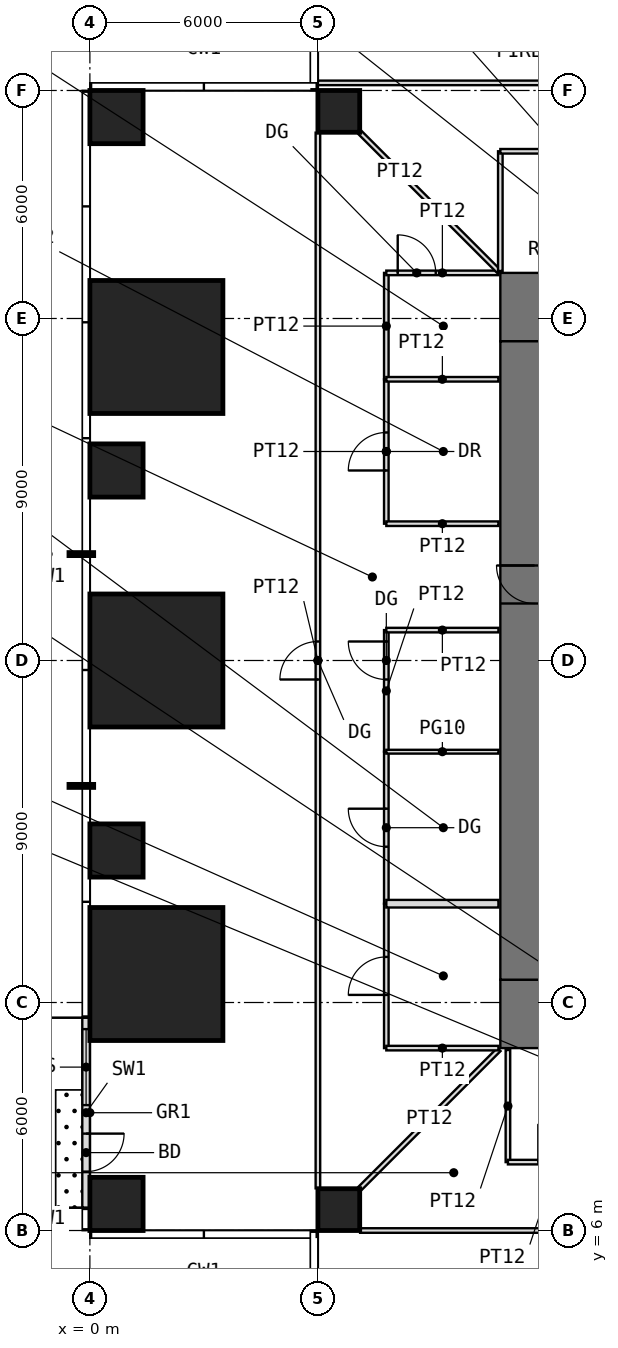
"""IFC4 building model, lengths in metres.
Left out: names, types, materials, properties, quantities, classifications, styles, units other than length and angle.
Written with IfcOpenShell. Run it as: python <this file> out.ifc"""

import sys

from ifc_helpers import new_model, si_unit, direction, frame, frame_2d, origin, origin_2d, place, context, subcontext, project, spatial, rectangle, extrude, element, fill, save


model = new_model("IFC4")
c1 = context("Model", 3, precision=1e-05, world=origin(), true_north=direction((0.0, 1.0)))
c2 = subcontext(c1, "Body", "Model", "MODEL_VIEW")
j1 = project(units=[si_unit("LENGTHUNIT", "METRE"), si_unit("PLANEANGLEUNIT", "RADIAN")], contexts=[c1])
p1 = place(None, origin())
s1 = spatial("IfcSite", under=j1, at=p1, CompositionType="ELEMENT")
p2 = place(p1, origin())
s2 = spatial("IfcBuilding", under=s1, at=p2, CompositionType="ELEMENT")
p3 = place(p2, frame((0.0, 0.0, 62.5)))
s3 = spatial("IfcBuildingStorey", under=s2, at=p3, CompositionType="ELEMENT", Elevation=62.5)
p4 = place(p3, frame((0.7, 6.7, 0.0), z_axis=(0.0, 0.0, 1.0), x_axis=(1.0, 0.0, 0.0)))
e1 = element("IfcColumn", 1, at=p4, inside=s3, PredefinedType="COLUMN", context=c2, shape_type="SweptSolid", body=[
    extrude(rectangle(XDim=1.4, YDim=1.4, at=origin_2d()), origin(), (0.0, 0.0, 1.0), 4.0),
])
p5 = place(p3, frame((6.55, 6.55, 0.0), z_axis=(0.0, 0.0, 1.0), x_axis=(1.0, 0.0, 0.0)))
e2 = element("IfcColumn", 2, at=p5, inside=s3, PredefinedType="COLUMN", context=c2, shape_type="SweptSolid", body=[
    extrude(rectangle(XDim=1.1, YDim=1.1, at=origin_2d()), origin(), (0.0, 0.0, 1.0), 4.0),
])
p6 = place(p3, frame((1.75, 12.75, 0.0), z_axis=(0.0, 0.0, 1.0), x_axis=(1.0, 0.0, 0.0)))
e3 = element("IfcColumn", 3, at=p6, inside=s3, PredefinedType="COLUMN", context=c2, shape_type="SweptSolid", body=[
    extrude(rectangle(XDim=3.5, YDim=3.5, at=origin_2d()), origin(), (0.0, 0.0, 1.0), 4.0),
])
p7 = place(p3, frame((0.7, 16.0, 0.0), z_axis=(0.0, 0.0, 1.0), x_axis=(1.0, 0.0, 0.0)))
e4 = element("IfcColumn", 4, at=p7, inside=s3, PredefinedType="COLUMN", context=c2, shape_type="SweptSolid", body=[
    extrude(rectangle(XDim=1.4, YDim=1.4, at=origin_2d()), origin(), (0.0, 0.0, 1.0), 4.0),
])
p8 = place(p3, frame((1.75, 21.0, 0.0), z_axis=(0.0, 0.0, 1.0), x_axis=(1.0, 0.0, 0.0)))
e5 = element("IfcColumn", 5, at=p8, inside=s3, PredefinedType="COLUMN", context=c2, shape_type="SweptSolid", body=[
    extrude(rectangle(XDim=3.5, YDim=3.5, at=origin_2d()), origin(), (0.0, 0.0, 1.0), 4.0),
])
p9 = place(p3, frame((0.7, 26.0, 0.0), z_axis=(0.0, 0.0, 1.0), x_axis=(1.0, 0.0, 0.0)))
e6 = element("IfcColumn", 6, at=p9, inside=s3, PredefinedType="COLUMN", context=c2, shape_type="SweptSolid", body=[
    extrude(rectangle(XDim=1.4, YDim=1.4, at=origin_2d()), origin(), (0.0, 0.0, 1.0), 4.0),
])
p10 = place(p3, frame((1.75, 29.25, 0.0), z_axis=(0.0, 0.0, 1.0), x_axis=(1.0, 0.0, 0.0)))
e7 = element("IfcColumn", 7, at=p10, inside=s3, PredefinedType="COLUMN", context=c2, shape_type="SweptSolid", body=[
    extrude(rectangle(XDim=3.5, YDim=3.5, at=origin_2d()), origin(), (0.0, 0.0, 1.0), 4.0),
])
p11 = place(p3, frame((0.7, 35.3, 0.0), z_axis=(0.0, 0.0, 1.0), x_axis=(1.0, 0.0, 0.0)))
e8 = element("IfcColumn", 8, at=p11, inside=s3, PredefinedType="COLUMN", context=c2, shape_type="SweptSolid", body=[
    extrude(rectangle(XDim=1.4, YDim=1.4, at=origin_2d()), origin(), (0.0, 0.0, 1.0), 4.0),
])
p12 = place(p3, frame((6.55, 35.45, 0.0), z_axis=(0.0, 0.0, 1.0), x_axis=(1.0, 0.0, 0.0)))
e9 = element("IfcColumn", 9, at=p12, inside=s3, PredefinedType="COLUMN", context=c2, shape_type="SweptSolid", body=[
    extrude(rectangle(XDim=1.1, YDim=1.1, at=origin_2d()), origin(), (0.0, 0.0, 1.0), 4.0),
])
p13 = place(p3, frame((-0.1, 11.6, 0.0), z_axis=(0.0, 0.0, 1.0), x_axis=(0.0, -1.0, 0.0)))
e10 = element("IfcWall", 10, at=p13, inside=s3, PredefinedType="USERDEFINED", context=c2, shape_type="SweptSolid", body=[
    extrude(rectangle(XDim=5.0, YDim=0.2, at=frame_2d((2.5, 0.0))), origin(), (0.0, 0.0, 1.0), 3.75),
])
p14 = place(p13, frame((3.05, 0.0, 0.0)))
e11 = element("IfcOpeningElement", 11, at=p14, cuts=e10, PredefinedType="OPENING", context=c2, shape_type="SweptSolid", body=[
    extrude(rectangle(XDim=1.0, YDim=2.4, at=frame_2d((0.5, 1.2))), frame((0.0, 0.11, 0.0), z_axis=(0.0, -1.0, 0.0), x_axis=(1.0, 0.0, 0.0)), (0.0, 0.0, 1.0), 0.22),
])
p15 = place(p13, frame((0.3, 0.0, 0.3)))
e12 = element("IfcOpeningElement", 12, at=p15, cuts=e10, PredefinedType="OPENING", context=c2, shape_type="SweptSolid", body=[
    extrude(rectangle(XDim=2.0, YDim=2.7, at=frame_2d((1.0, 1.35))), frame((0.0, 0.11, 0.0), z_axis=(0.0, -1.0, 0.0), x_axis=(1.0, 0.0, 0.0)), (0.0, 0.0, 1.0), 0.22),
])
p16 = place(p3, frame((10.8, 11.7, -0.05), z_axis=(0.0, 0.0, 1.0), x_axis=(1.0, 0.0, 0.0)))
e13 = element("IfcWall", 13, at=p16, inside=s3, PredefinedType="SHEAR", context=c2, shape_type="SweptSolid", body=[
    extrude(rectangle(XDim=20.4, YDim=1.8, at=frame_2d((10.2, 0.0))), origin(), (0.0, 0.0, 1.0), 4.0),
])
p17 = place(p16, frame((9.2, 0.0, 0.05)))
e14 = element("IfcOpeningElement", 14, at=p17, cuts=e13, PredefinedType="OPENING", context=c2, shape_type="SweptSolid", body=[
    extrude(rectangle(XDim=2.0, YDim=2.2, at=frame_2d((1.0, 1.1))), frame((0.0, 0.91, 0.0), z_axis=(0.0, -1.0, 0.0), x_axis=(1.0, 0.0, 0.0)), (0.0, 0.0, 1.0), 1.82),
])
p18 = place(p3, frame((10.8, 30.3, -0.05), z_axis=(0.0, 0.0, 1.0), x_axis=(1.0, 0.0, 0.0)))
e15 = element("IfcWall", 15, at=p18, inside=s3, PredefinedType="SHEAR", context=c2, shape_type="SweptSolid", body=[
    extrude(rectangle(XDim=20.4, YDim=1.8, at=frame_2d((10.2, 0.0))), origin(), (0.0, 0.0, 1.0), 4.0),
])
p19 = place(p18, frame((9.2, 0.0, 0.05)))
e16 = element("IfcOpeningElement", 16, at=p19, cuts=e15, PredefinedType="OPENING", context=c2, shape_type="SweptSolid", body=[
    extrude(rectangle(XDim=2.0, YDim=2.2, at=frame_2d((1.0, 1.1))), frame((0.0, 0.91, 0.0), z_axis=(0.0, -1.0, 0.0), x_axis=(1.0, 0.0, 0.0)), (0.0, 0.0, 1.0), 1.82),
])
p20 = place(p3, frame((11.7, 12.6, -0.05), z_axis=(0.0, 0.0, 1.0), x_axis=(0.0, 1.0, 0.0)))
e17 = element("IfcWall", 17, at=p20, inside=s3, PredefinedType="SHEAR", context=c2, shape_type="SweptSolid", body=[
    extrude(rectangle(XDim=16.8, YDim=1.8, at=frame_2d((8.4, 0.0))), origin(), (0.0, 0.0, 1.0), 4.0),
])
p21 = place(p20, frame((9.9, 0.0, 0.05)))
e18 = element("IfcOpeningElement", 18, at=p21, cuts=e17, PredefinedType="OPENING", context=c2, shape_type="SweptSolid", body=[
    extrude(rectangle(XDim=1.0, YDim=2.2, at=frame_2d((0.5, 1.1))), frame((0.0, 0.91, 0.0), z_axis=(0.0, -1.0, 0.0), x_axis=(1.0, 0.0, 0.0)), (0.0, 0.0, 1.0), 1.82),
])
p22 = place(p3, frame((6.0, 7.11, 0.0), z_axis=(0.0, 0.0, 1.0), x_axis=(0.0, 1.0, 0.0)))
e19 = element("IfcWall", 19, at=p22, inside=s3, PredefinedType="PARTITIONING", context=c2, shape_type="SweptSolid", body=[
    extrude(rectangle(XDim=27.78, YDim=0.12, at=frame_2d((13.89, 0.0))), origin(), (0.0, 0.0, 1.0), 3.75),
])
p23 = place(p22, frame((13.39, 0.0, 0.0)))
e20 = element("IfcOpeningElement", 20, at=p23, cuts=e19, PredefinedType="OPENING", context=c2, shape_type="SweptSolid", body=[
    extrude(rectangle(XDim=1.0, YDim=2.4, at=frame_2d((0.5, 1.2))), frame((0.0, 0.07, 0.0), z_axis=(0.0, -1.0, 0.0), x_axis=(1.0, 0.0, 0.0)), (0.0, 0.0, 1.0), 0.14),
])
p24 = place(p3, frame((6.0, 36.2, 0.0), z_axis=(0.0, 0.0, 1.0), x_axis=(1.0, 0.0, 0.0)))
e21 = element("IfcWall", 21, at=p24, inside=s3, PredefinedType="PARTITIONING", context=c2, shape_type="SweptSolid", body=[
    extrude(rectangle(XDim=30.0, YDim=0.12, at=frame_2d((15.0, 0.0))), origin(), (0.0, 0.0, 1.0), 3.75),
])
p25 = place(p24, frame((14.5, 0.0, 0.0)))
e22 = element("IfcOpeningElement", 22, at=p25, cuts=e21, PredefinedType="OPENING", context=c2, shape_type="SweptSolid", body=[
    extrude(rectangle(XDim=1.0, YDim=2.4, at=frame_2d((0.5, 1.2))), frame((0.0, 0.07, 0.0), z_axis=(0.0, -1.0, 0.0), x_axis=(1.0, 0.0, 0.0)), (0.0, 0.0, 1.0), 0.14),
])
p26 = place(p3, frame((7.11, 6.0, 0.0), z_axis=(0.0, 0.0, 1.0), x_axis=(1.0, 0.0, 0.0)))
e23 = element("IfcWall", 23, at=p26, inside=s3, PredefinedType="PARTITIONING", context=c2, shape_type="SweptSolid", body=[
    extrude(rectangle(XDim=27.78, YDim=0.12, at=frame_2d((13.89, 0.0))), origin(), (0.0, 0.0, 1.0), 3.75),
])
p27 = place(p26, frame((13.39, 0.0, 0.0)))
e24 = element("IfcOpeningElement", 24, at=p27, cuts=e23, PredefinedType="OPENING", context=c2, shape_type="SweptSolid", body=[
    extrude(rectangle(XDim=1.0, YDim=2.4, at=frame_2d((0.5, 1.2))), frame((0.0, 0.07, 0.0), z_axis=(0.0, -1.0, 0.0), x_axis=(1.0, 0.0, 0.0)), (0.0, 0.0, 1.0), 0.14),
])
p28 = place(p3, frame((7.11, 7.11, 0.0), z_axis=(0.0, 0.0, 1.0), x_axis=(0.707106781187, 0.707106781187, 0.0)))
e25 = element("IfcWall", 25, at=p28, inside=s3, PredefinedType="PARTITIONING", context=c2, shape_type="SweptSolid", body=[
    extrude(rectangle(XDim=5.168, YDim=0.12, at=frame_2d((2.584, 0.0))), origin(), (0.0, 0.0, 1.0), 3.75),
])
p29 = place(p3, frame((7.11, 34.89, 0.0), z_axis=(0.0, 0.0, 1.0), x_axis=(0.707106781187, -0.707106781187, 0.0)))
e26 = element("IfcWall", 26, at=p29, inside=s3, PredefinedType="PARTITIONING", context=c2, shape_type="SweptSolid", body=[
    extrude(rectangle(XDim=2.95, YDim=0.12, at=frame_2d((1.475, 0.0))), origin(), (0.0, 0.0, 1.0), 3.75),
])
p30 = place(p3, frame((7.8, 10.8, 0.0), z_axis=(0.0, 0.0, 1.0), x_axis=(0.0, 1.0, 0.0)))
e27 = element("IfcWall", 27, at=p30, inside=s3, PredefinedType="PARTITIONING", context=c2, shape_type="SweptSolid", body=[
    extrude(rectangle(XDim=3.8, YDim=0.12, at=frame_2d((1.9, 0.0))), origin(), (0.0, 0.0, 1.0), 3.75),
])
p31 = place(p30, frame((1.4, 0.0, 0.0)))
e28 = element("IfcOpeningElement", 28, at=p31, cuts=e27, PredefinedType="OPENING", context=c2, shape_type="SweptSolid", body=[
    extrude(rectangle(XDim=1.0, YDim=2.4, at=frame_2d((0.5, 1.2))), frame((0.0, 0.07, 0.0), z_axis=(0.0, -1.0, 0.0), x_axis=(1.0, 0.0, 0.0)), (0.0, 0.0, 1.0), 0.14),
])
p32 = place(p3, frame((7.8, 10.8, 0.0), z_axis=(0.0, 0.0, 1.0), x_axis=(1.0, 0.0, 0.0)))
e29 = element("IfcWall", 29, at=p32, inside=s3, PredefinedType="PARTITIONING", context=c2, shape_type="SweptSolid", body=[
    extrude(rectangle(XDim=2.95, YDim=0.12, at=frame_2d((1.475, 0.0))), origin(), (0.0, 0.0, 1.0), 3.75),
])
p33 = place(p3, frame((7.8, 14.6, 0.0), z_axis=(0.0, 0.0, 1.0), x_axis=(0.0, 1.0, 0.0)))
e30 = element("IfcWall", 30, at=p33, inside=s3, PredefinedType="PARTITIONING", context=c2, shape_type="SweptSolid", body=[
    extrude(rectangle(XDim=4.0, YDim=0.12, at=frame_2d((2.0, 0.0))), origin(), (0.0, 0.0, 1.0), 3.75),
])
p34 = place(p33, frame((1.5, 0.0, 0.0)))
e31 = element("IfcOpeningElement", 31, at=p34, cuts=e30, PredefinedType="OPENING", context=c2, shape_type="SweptSolid", body=[
    extrude(rectangle(XDim=1.0, YDim=2.4, at=frame_2d((0.5, 1.2))), frame((0.0, 0.07, 0.0), z_axis=(0.0, -1.0, 0.0), x_axis=(1.0, 0.0, 0.0)), (0.0, 0.0, 1.0), 0.14),
])
p35 = place(p3, frame((7.8, 14.6, 0.0), z_axis=(0.0, 0.0, 1.0), x_axis=(1.0, 0.0, 0.0)))
e32 = element("IfcWall", 32, at=p35, inside=s3, PredefinedType="PARTITIONING", context=c2, shape_type="SweptSolid", body=[
    extrude(rectangle(XDim=2.95, YDim=0.2, at=frame_2d((1.475, 0.0))), origin(), (0.0, 0.0, 1.0), 3.75),
])
p36 = place(p3, frame((7.8, 18.6, 0.0), z_axis=(0.0, 0.0, 1.0), x_axis=(0.0, 1.0, 0.0)))
e33 = element("IfcWall", 33, at=p36, inside=s3, PredefinedType="PARTITIONING", context=c2, shape_type="SweptSolid", body=[
    extrude(rectangle(XDim=3.2, YDim=0.12, at=frame_2d((1.6, 0.0))), origin(), (0.0, 0.0, 1.0), 3.75),
])
p37 = place(p36, frame((1.9, 0.0, 0.0)))
e34 = element("IfcOpeningElement", 34, at=p37, cuts=e33, PredefinedType="OPENING", context=c2, shape_type="SweptSolid", body=[
    extrude(rectangle(XDim=1.0, YDim=2.4, at=frame_2d((0.5, 1.2))), frame((0.0, 0.07, 0.0), z_axis=(0.0, -1.0, 0.0), x_axis=(1.0, 0.0, 0.0)), (0.0, 0.0, 1.0), 0.14),
])
p38 = place(p3, frame((7.8, 18.6, 0.0), z_axis=(0.0, 0.0, 1.0), x_axis=(1.0, 0.0, 0.0)))
e35 = element("IfcWall", 35, at=p38, inside=s3, PredefinedType="PARTITIONING", context=c2, shape_type="SweptSolid", body=[
    extrude(rectangle(XDim=2.95, YDim=0.1, at=frame_2d((1.475, 0.0))), origin(), (0.0, 0.0, 1.0), 3.75),
])
p39 = place(p3, frame((7.8, 21.8, 0.0), z_axis=(0.0, 0.0, 1.0), x_axis=(1.0, 0.0, 0.0)))
e36 = element("IfcWall", 36, at=p39, inside=s3, PredefinedType="PARTITIONING", context=c2, shape_type="SweptSolid", body=[
    extrude(rectangle(XDim=2.95, YDim=0.12, at=frame_2d((1.475, 0.0))), origin(), (0.0, 0.0, 1.0), 3.75),
])
p40 = place(p3, frame((7.8, 24.6, 0.0), z_axis=(0.0, 0.0, 1.0), x_axis=(0.0, 1.0, 0.0)))
e37 = element("IfcWall", 37, at=p40, inside=s3, PredefinedType="PARTITIONING", context=c2, shape_type="SweptSolid", body=[
    extrude(rectangle(XDim=3.8, YDim=0.12, at=frame_2d((1.9, 0.0))), origin(), (0.0, 0.0, 1.0), 3.75),
])
p41 = place(p40, frame((1.4, 0.0, 0.0)))
e38 = element("IfcOpeningElement", 38, at=p41, cuts=e37, PredefinedType="OPENING", context=c2, shape_type="SweptSolid", body=[
    extrude(rectangle(XDim=1.0, YDim=2.2, at=frame_2d((0.5, 1.1))), frame((0.0, 0.07, 0.0), z_axis=(0.0, -1.0, 0.0), x_axis=(1.0, 0.0, 0.0)), (0.0, 0.0, 1.0), 0.14),
])
p42 = place(p3, frame((7.8, 24.6, 0.0), z_axis=(0.0, 0.0, 1.0), x_axis=(1.0, 0.0, 0.0)))
e39 = element("IfcWall", 39, at=p42, inside=s3, PredefinedType="PARTITIONING", context=c2, shape_type="SweptSolid", body=[
    extrude(rectangle(XDim=2.95, YDim=0.12, at=frame_2d((1.475, 0.0))), origin(), (0.0, 0.0, 1.0), 3.75),
])
p43 = place(p3, frame((7.8, 28.4, 0.0), z_axis=(0.0, 0.0, 1.0), x_axis=(0.0, 1.0, 0.0)))
e40 = element("IfcWall", 40, at=p43, inside=s3, PredefinedType="PARTITIONING", context=c2, shape_type="SweptSolid", body=[
    extrude(rectangle(XDim=2.8, YDim=0.12, at=frame_2d((1.4, 0.0))), origin(), (0.0, 0.0, 1.0), 3.75),
])
p44 = place(p3, frame((7.8, 28.4, 0.0), z_axis=(0.0, 0.0, 1.0), x_axis=(1.0, 0.0, 0.0)))
e41 = element("IfcWall", 41, at=p44, inside=s3, PredefinedType="PARTITIONING", context=c2, shape_type="SweptSolid", body=[
    extrude(rectangle(XDim=2.95, YDim=0.12, at=frame_2d((1.475, 0.0))), origin(), (0.0, 0.0, 1.0), 3.75),
])
p45 = place(p3, frame((7.8, 31.2, 0.0), z_axis=(0.0, 0.0, 1.0), x_axis=(1.0, 0.0, 0.0)))
e42 = element("IfcWall", 42, at=p45, inside=s3, PredefinedType="PARTITIONING", context=c2, shape_type="SweptSolid", body=[
    extrude(rectangle(XDim=2.95, YDim=0.12, at=frame_2d((1.475, 0.0))), origin(), (0.0, 0.0, 1.0), 3.75),
])
p46 = place(p45, frame((0.3, 0.0, 0.0)))
e43 = element("IfcOpeningElement", 43, at=p46, cuts=e42, PredefinedType="OPENING", context=c2, shape_type="SweptSolid", body=[
    extrude(rectangle(XDim=1.0, YDim=2.4, at=frame_2d((0.5, 1.2))), frame((0.0, 0.07, 0.0), z_axis=(0.0, -1.0, 0.0), x_axis=(1.0, 0.0, 0.0)), (0.0, 0.0, 1.0), 0.14),
])
p47 = place(p3, frame((9.196, 32.804, 0.0), z_axis=(0.0, 0.0, 1.0), x_axis=(0.707106781187, -0.707106781187, 0.0)))
e44 = element("IfcWall", 44, at=p47, inside=s3, PredefinedType="PARTITIONING", context=c2, shape_type="SweptSolid", body=[
    extrude(rectangle(XDim=2.218, YDim=0.12, at=frame_2d((1.109, 0.0))), origin(), (0.0, 0.0, 1.0), 3.75),
])
p48 = place(p3, frame((10.8, 31.25, 0.0), z_axis=(0.0, 0.0, 1.0), x_axis=(0.0, 1.0, 0.0)))
e45 = element("IfcWall", 45, at=p48, inside=s3, PredefinedType="PARTITIONING", context=c2, shape_type="SweptSolid", body=[
    extrude(rectangle(XDim=3.15, YDim=0.12, at=frame_2d((1.575, 0.0))), origin(), (0.0, 0.0, 1.0), 3.75),
])
p49 = place(p3, frame((10.8, 34.4, 0.0), z_axis=(0.0, 0.0, 1.0), x_axis=(1.0, 0.0, 0.0)))
e46 = element("IfcWall", 46, at=p49, inside=s3, PredefinedType="PARTITIONING", context=c2, shape_type="SweptSolid", body=[
    extrude(rectangle(XDim=3.2, YDim=0.12, at=frame_2d((1.6, 0.0))), origin(), (0.0, 0.0, 1.0), 3.75),
])
p50 = place(p49, frame((1.1, 0.0, 0.0)))
e47 = element("IfcOpeningElement", 47, at=p50, cuts=e46, PredefinedType="OPENING", context=c2, shape_type="SweptSolid", body=[
    extrude(rectangle(XDim=1.0, YDim=2.2, at=frame_2d((0.5, 1.1))), frame((0.0, 0.07, 0.0), z_axis=(0.0, -1.0, 0.0), x_axis=(1.0, 0.0, 0.0)), (0.0, 0.0, 1.0), 0.14),
])
p51 = place(p3, frame((11.0, 7.8, 0.0), z_axis=(0.0, 0.0, 1.0), x_axis=(0.0, 1.0, 0.0)))
e48 = element("IfcWall", 48, at=p51, inside=s3, PredefinedType="PARTITIONING", context=c2, shape_type="SweptSolid", body=[
    extrude(rectangle(XDim=2.95, YDim=0.12, at=frame_2d((1.475, 0.0))), origin(), (0.0, 0.0, 1.0), 3.75),
])
p52 = place(p3, frame((11.0, 7.8, 0.0), z_axis=(0.0, 0.0, 1.0), x_axis=(1.0, 0.0, 0.0)))
e49 = element("IfcWall", 49, at=p52, inside=s3, PredefinedType="PARTITIONING", context=c2, shape_type="SweptSolid", body=[
    extrude(rectangle(XDim=2.6, YDim=0.12, at=frame_2d((1.3, 0.0))), origin(), (0.0, 0.0, 1.0), 3.75),
])
p53 = place(p52, frame((0.8, 0.0, 0.0)))
e50 = element("IfcOpeningElement", 50, at=p53, cuts=e49, PredefinedType="OPENING", context=c2, shape_type="SweptSolid", body=[
    extrude(rectangle(XDim=1.0, YDim=2.4, at=frame_2d((0.5, 1.2))), frame((0.0, 0.07, 0.0), z_axis=(0.0, -1.0, 0.0), x_axis=(1.0, 0.0, 0.0)), (0.0, 0.0, 1.0), 0.14),
])
p54 = place(p14, origin())
e51 = element("IfcDoor", 51, at=p54, inside=s3, OperationType="SINGLE_SWING_LEFT", PredefinedType="DOOR", context=c2, shape_type="SweptSolid", body=[
    extrude(rectangle(XDim=1.0, YDim=2.4, at=frame_2d((0.5, 1.2))), frame((0.0, 0.025, 0.0), z_axis=(0.0, -1.0, 0.0), x_axis=(1.0, 0.0, 0.0)), (0.0, 0.0, 1.0), 0.05),
])
fill(e11, e51)
p55 = place(p15, origin())
e52 = element("IfcWindow", 52, at=p55, inside=s3, PartitioningType="SINGLE_PANEL", PredefinedType="WINDOW", context=c2, shape_type="SweptSolid", body=[
    extrude(rectangle(XDim=2.0, YDim=2.7, at=frame_2d((1.0, 1.35))), frame((0.0, 0.03, 0.0), z_axis=(0.0, -1.0, 0.0), x_axis=(1.0, 0.0, 0.0)), (0.0, 0.0, 1.0), 0.06),
])
fill(e12, e52)
p56 = place(p21, origin())
e53 = element("IfcDoor", 53, at=p56, inside=s3, OperationType="SINGLE_SWING_RIGHT", PredefinedType="DOOR", context=c2, shape_type="SweptSolid", body=[
    extrude(rectangle(XDim=1.0, YDim=2.2, at=frame_2d((0.5, 1.1))), frame((0.0, 0.025, 0.0), z_axis=(0.0, -1.0, 0.0), x_axis=(1.0, 0.0, 0.0)), (0.0, 0.0, 1.0), 0.05),
])
fill(e18, e53)
p57 = place(p31, origin())
e54 = element("IfcDoor", 54, at=p57, inside=s3, OperationType="SINGLE_SWING_LEFT", PredefinedType="DOOR", context=c2, shape_type="SweptSolid", body=[
    extrude(rectangle(XDim=1.0, YDim=2.4, at=frame_2d((0.5, 1.2))), frame((0.0, 0.025, 0.0), z_axis=(0.0, -1.0, 0.0), x_axis=(1.0, 0.0, 0.0)), (0.0, 0.0, 1.0), 0.05),
])
fill(e28, e54)
p58 = place(p34, origin())
e55 = element("IfcDoor", 55, at=p58, inside=s3, OperationType="SINGLE_SWING_RIGHT", PredefinedType="DOOR", context=c2, shape_type="SweptSolid", body=[
    extrude(rectangle(XDim=1.0, YDim=2.4, at=frame_2d((0.5, 1.2))), frame((0.0, 0.025, 0.0), z_axis=(0.0, -1.0, 0.0), x_axis=(1.0, 0.0, 0.0)), (0.0, 0.0, 1.0), 0.05),
])
fill(e31, e55)
p59 = place(p41, origin())
e56 = element("IfcDoor", 56, at=p59, inside=s3, OperationType="SINGLE_SWING_LEFT", PredefinedType="DOOR", context=c2, shape_type="SweptSolid", body=[
    extrude(rectangle(XDim=1.0, YDim=2.2, at=frame_2d((0.5, 1.1))), frame((0.0, 0.025, 0.0), z_axis=(0.0, -1.0, 0.0), x_axis=(1.0, 0.0, 0.0)), (0.0, 0.0, 1.0), 0.05),
])
fill(e38, e56)
p60 = place(p23, origin())
e57 = element("IfcDoor", 57, at=p60, inside=s3, OperationType="SINGLE_SWING_LEFT", PredefinedType="DOOR", context=c2, shape_type="SweptSolid", body=[
    extrude(rectangle(XDim=1.0, YDim=2.4, at=frame_2d((0.5, 1.2))), frame((0.0, 0.025, 0.0), z_axis=(0.0, -1.0, 0.0), x_axis=(1.0, 0.0, 0.0)), (0.0, 0.0, 1.0), 0.05),
])
fill(e20, e57)
p61 = place(p46, origin())
e58 = element("IfcDoor", 58, at=p61, inside=s3, OperationType="SINGLE_SWING_LEFT", PredefinedType="DOOR", context=c2, shape_type="SweptSolid", body=[
    extrude(rectangle(XDim=1.0, YDim=2.4, at=frame_2d((0.5, 1.2))), frame((0.0, 0.025, 0.0), z_axis=(0.0, -1.0, 0.0), x_axis=(1.0, 0.0, 0.0)), (0.0, 0.0, 1.0), 0.05),
])
fill(e43, e58)
p62 = place(p37, origin())
e59 = element("IfcDoor", 59, at=p62, inside=s3, OperationType="SINGLE_SWING_RIGHT", PredefinedType="DOOR", context=c2, shape_type="SweptSolid", body=[
    extrude(rectangle(XDim=1.0, YDim=2.4, at=frame_2d((0.5, 1.2))), frame((0.0, 0.025, 0.0), z_axis=(0.0, -1.0, 0.0), x_axis=(1.0, 0.0, 0.0)), (0.0, 0.0, 1.0), 0.05),
])
fill(e34, e59)
save(model, sys.argv[1])
